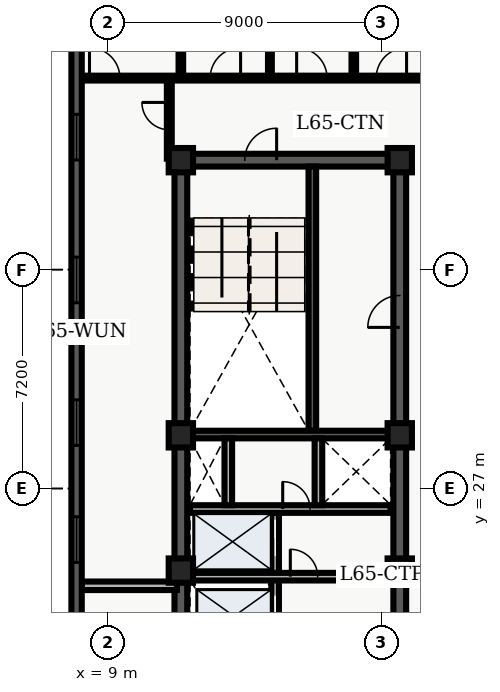
"""IFC4 building model, lengths in metres.
Left out: names, types, materials, properties, quantities, classifications, styles, units other than length and angle.
Written with IfcOpenShell. Run it as: python <this file> out.ifc"""

import sys

from ifc_helpers import new_model, entity, si_unit, converted_unit, direction, frame, origin_with_axes, origin_2d_with_axis, place, context, subcontext, project, spatial, polyline, rectangle, outline, extrude, element, fill, save


model = new_model("IFC4")
c1 = context("Model", 3, precision=1e-05, world=origin_with_axes(), true_north=direction((0.0, 1.0)))
c2 = subcontext(c1, "Body", "Model", "MODEL_VIEW")
j1 = project(units=[si_unit("LENGTHUNIT", "METRE"), converted_unit("PLANEANGLEUNIT", "DEGREE", entity("IfcPlaneAngleMeasure", 0.017), si_unit("PLANEANGLEUNIT", "RADIAN"), dimensions=[0, 0, 0, 0, 0, 0, 0])], contexts=[c1])
p1 = place(None, origin_with_axes())
s1 = spatial("IfcSite", under=j1, at=p1, CompositionType="ELEMENT")
p2 = place(p1, origin_with_axes())
s2 = spatial("IfcBuilding", under=s1, at=p2, CompositionType="ELEMENT")
p3 = place(p2, frame((0.0, 0.0, 264.6), z_axis=(0.0, 0.0, 1.0), x_axis=(1.0, 0.0, 0.0)))
s3 = spatial("IfcBuildingStorey", under=s2, at=p3, CompositionType="ELEMENT", Elevation=264.6)
p4 = place(p3, frame((11.4, 10.8, 0.0), z_axis=(0.0, 0.0, 1.0), x_axis=(0.0, 1.0, 0.0)))
e1 = element("IfcWall", 1, at=p4, inside=s3, PredefinedType="SHEAR", context=c2, shape_type="SweptSolid", body=[
    extrude(outline(polyline([(0.0, -0.21), (27.0, -0.21), (27.0, 0.21), (0.0, 0.21), (0.0, -0.21)])), origin_with_axes(), (0.0, 0.0, 1.0), 3.66),
])
p5 = place(p3, frame((11.4, 37.8, 0.0), z_axis=(0.0, 0.0, 1.0), x_axis=(1.0, 0.0, 0.0)))
e2 = element("IfcWall", 2, at=p5, inside=s3, PredefinedType="SHEAR", context=c2, shape_type="SweptSolid", body=[
    extrude(outline(polyline([(0.0, -0.21), (7.2, -0.21), (7.2, 0.21), (0.0, 0.21), (0.0, -0.21)])), origin_with_axes(), (0.0, 0.0, 1.0), 3.66),
])
p6 = place(p5, frame((2.625, 0.0, 0.0), z_axis=(0.0, 0.0, 1.0), x_axis=(1.0, 0.0, 0.0)))
e3 = element("IfcOpeningElement", 3, at=p6, cuts=e2, PredefinedType="OPENING", context=c2, shape_type="SweptSolid", body=[
    extrude(rectangle(XDim=1.05, YDim=0.44, at=origin_2d_with_axis()), origin_with_axes(), (0.0, 0.0, 1.0), 2.15),
])
p7 = place(p3, frame((18.6, 10.8, 0.0), z_axis=(0.0, 0.0, 1.0), x_axis=(0.0, 1.0, 0.0)))
e4 = element("IfcWall", 4, at=p7, inside=s3, PredefinedType="SHEAR", context=c2, shape_type="SweptSolid", body=[
    extrude(outline(polyline([(0.0, -0.21), (13.5, -0.21), (13.5, 0.21), (0.0, 0.21), (0.0, -0.21)])), origin_with_axes(), (0.0, 0.0, 1.0), 3.66),
])
p8 = place(p7, frame((1.3, 0.0, 0.0), z_axis=(0.0, 0.0, 1.0), x_axis=(1.0, 0.0, 0.0)))
e5 = element("IfcOpeningElement", 5, at=p8, cuts=e4, PredefinedType="OPENING", context=c2, shape_type="SweptSolid", body=[
    extrude(rectangle(XDim=1.1, YDim=0.44, at=origin_2d_with_axis()), origin_with_axes(), (0.0, 0.0, 1.0), 2.15),
])
p9 = place(p7, frame((3.4, 0.0, 0.0), z_axis=(0.0, 0.0, 1.0), x_axis=(1.0, 0.0, 0.0)))
e6 = element("IfcOpeningElement", 6, at=p9, cuts=e4, PredefinedType="OPENING", context=c2, shape_type="SweptSolid", body=[
    extrude(rectangle(XDim=1.1, YDim=0.44, at=origin_2d_with_axis()), origin_with_axes(), (0.0, 0.0, 1.0), 2.15),
])
p10 = place(p7, frame((11.125, 0.0, 0.0), z_axis=(0.0, 0.0, 1.0), x_axis=(1.0, 0.0, 0.0)))
e7 = element("IfcOpeningElement", 7, at=p10, cuts=e4, PredefinedType="OPENING", context=c2, shape_type="SweptSolid", body=[
    extrude(rectangle(XDim=1.05, YDim=0.44, at=origin_2d_with_axis()), origin_with_axes(), (0.0, 0.0, 1.0), 2.15),
])
p11 = place(p7, frame((6.675, 0.0, 0.0), z_axis=(0.0, 0.0, 1.0), x_axis=(1.0, 0.0, 0.0)))
e8 = element("IfcOpeningElement", 8, at=p11, cuts=e4, PredefinedType="OPENING", context=c2, shape_type="SweptSolid", body=[
    extrude(rectangle(XDim=0.95, YDim=0.44, at=origin_2d_with_axis()), origin_with_axes(), (0.0, 0.0, 1.0), 2.15),
])
p12 = place(p3, frame((18.6, 24.3, 0.0), z_axis=(0.0, 0.0, 1.0), x_axis=(0.0, 1.0, 0.0)))
e9 = element("IfcWall", 9, at=p12, inside=s3, PredefinedType="SHEAR", context=c2, shape_type="SweptSolid", body=[
    extrude(outline(polyline([(0.0, -0.21), (13.5, -0.21), (13.5, 0.21), (0.0, 0.21), (0.0, -0.21)])), origin_with_axes(), (0.0, 0.0, 1.0), 3.66),
])
p13 = place(p12, frame((8.525, 0.0, 0.0), z_axis=(0.0, 0.0, 1.0), x_axis=(1.0, 0.0, 0.0)))
e10 = element("IfcOpeningElement", 10, at=p13, cuts=e9, PredefinedType="OPENING", context=c2, shape_type="SweptSolid", body=[
    extrude(rectangle(XDim=1.05, YDim=0.44, at=origin_2d_with_axis()), origin_with_axes(), (0.0, 0.0, 1.0), 2.15),
])
p14 = place(p3, frame((15.725, 28.9, 0.0), z_axis=(0.0, 0.0, 1.0), x_axis=(0.0, 1.0, 0.0)))
e11 = element("IfcWall", 11, at=p14, inside=s3, PredefinedType="SHEAR", context=c2, shape_type="SweptSolid", body=[
    extrude(outline(polyline([(0.0, -0.125), (8.69, -0.125), (8.69, 0.125), (0.0, 0.125), (0.0, -0.125)])), origin_with_axes(), (0.0, 0.0, 1.0), 3.66),
])
p15 = place(p3, frame((11.61, 28.775, 0.0), z_axis=(0.0, 0.0, 1.0), x_axis=(1.0, 0.0, 0.0)))
e12 = element("IfcWall", 12, at=p15, inside=s3, PredefinedType="SHEAR", context=c2, shape_type="SweptSolid", body=[
    extrude(outline(polyline([(0.0, -0.125), (6.78, -0.125), (6.78, 0.125), (0.0, 0.125), (0.0, -0.125)])), origin_with_axes(), (0.0, 0.0, 1.0), 3.66),
])
p16 = place(p3, frame((14.5, 19.95, 0.0), z_axis=(0.0, 0.0, 1.0), x_axis=(0.0, 1.0, 0.0)))
e13 = element("IfcWall", 13, at=p16, inside=s3, PredefinedType="SOLIDWALL", context=c2, shape_type="SweptSolid", body=[
    extrude(outline(polyline([(0.0, -0.125), (6.25, -0.125), (6.25, 0.125), (0.0, 0.125), (0.0, -0.125)])), origin_with_axes(), (0.0, 0.0, 1.0), 2.7),
])
p17 = place(p16, frame((1.025, 0.0, 0.0), z_axis=(0.0, 0.0, 1.0), x_axis=(1.0, 0.0, 0.0)))
e14 = element("IfcOpeningElement", 14, at=p17, cuts=e13, PredefinedType="OPENING", context=c2, shape_type="SweptSolid", body=[
    extrude(rectangle(XDim=1.1, YDim=0.27, at=origin_2d_with_axis()), origin_with_axes(), (0.0, 0.0, 1.0), 2.15),
])
p18 = place(p16, frame((2.975, 0.0, 0.0), z_axis=(0.0, 0.0, 1.0), x_axis=(1.0, 0.0, 0.0)))
e15 = element("IfcOpeningElement", 15, at=p18, cuts=e13, PredefinedType="OPENING", context=c2, shape_type="SweptSolid", body=[
    extrude(rectangle(XDim=1.1, YDim=0.27, at=origin_2d_with_axis()), origin_with_axes(), (0.0, 0.0, 1.0), 2.15),
])
p19 = place(p16, frame((5.425, 0.0, 0.0), z_axis=(0.0, 0.0, 1.0), x_axis=(1.0, 0.0, 0.0)))
e16 = element("IfcOpeningElement", 16, at=p19, cuts=e13, PredefinedType="OPENING", context=c2, shape_type="SweptSolid", body=[
    extrude(rectangle(XDim=1.2, YDim=0.27, at=origin_2d_with_axis()), origin_with_axes(), (0.0, 0.0, 1.0), 2.15),
])
p20 = place(p3, frame((11.7, 24.1, 0.0), z_axis=(0.0, 0.0, 1.0), x_axis=(1.0, 0.0, 0.0)))
e17 = element("IfcWall", 17, at=p20, inside=s3, PredefinedType="SOLIDWALL", context=c2, shape_type="SweptSolid", body=[
    extrude(outline(polyline([(0.0, -0.125), (6.6, -0.125), (6.6, 0.125), (0.0, 0.125), (0.0, -0.125)])), origin_with_axes(), (0.0, 0.0, 1.0), 2.7),
])
p21 = place(p20, frame((3.75, 0.0, 0.0), z_axis=(0.0, 0.0, 1.0), x_axis=(1.0, 0.0, 0.0)))
e18 = element("IfcOpeningElement", 18, at=p21, cuts=e17, PredefinedType="OPENING", context=c2, shape_type="SweptSolid", body=[
    extrude(rectangle(XDim=0.9, YDim=0.27, at=origin_2d_with_axis()), origin_with_axes(), (0.0, 0.0, 1.0), 2.15),
])
p22 = place(p3, frame((11.7, 26.325, 0.0), z_axis=(0.0, 0.0, 1.0), x_axis=(1.0, 0.0, 0.0)))
e19 = element("IfcWall", 19, at=p22, inside=s3, PredefinedType="SOLIDWALL", context=c2, shape_type="SweptSolid", body=[
    extrude(outline(polyline([(0.0, -0.125), (6.6, -0.125), (6.6, 0.125), (0.0, 0.125), (0.0, -0.125)])), origin_with_axes(), (0.0, 0.0, 1.0), 2.7),
])
p23 = place(p22, frame((3.5, 0.0, 0.0), z_axis=(0.0, 0.0, 1.0), x_axis=(1.0, 0.0, 0.0)))
e20 = element("IfcOpeningElement", 20, at=p23, cuts=e19, PredefinedType="OPENING", context=c2, shape_type="SweptSolid", body=[
    extrude(rectangle(XDim=0.9, YDim=0.27, at=origin_2d_with_axis()), origin_with_axes(), (0.0, 0.0, 1.0), 2.15),
])
for number, where, z_axis, x_axis in (
    (21, (12.96, 26.45, 0.0), (0.0, 0.0, 1.0), (0.0, 1.0, 0.0)),
    (22, (15.925, 26.45, 0.0), (0.0, 0.0, 1.0), (0.0, 1.0, 0.0)),
):
    element("IfcWall", number, at=place(p3, frame(where, z_axis=z_axis, x_axis=x_axis)), inside=s3, PredefinedType="SOLIDWALL", context=c2, shape_type="SweptSolid", body=[
        extrude(outline(polyline([(0.0, -0.125), (2.2, -0.125), (2.2, 0.125), (0.0, 0.125), (0.0, -0.125)])), origin_with_axes(), (0.0, 0.0, 1.0), 2.7),
    ])
for number, where, z_axis, x_axis in (
    (23, (11.4, 24.3, 0.0), (0.0, 0.0, 1.0), (1.0, 0.0, 0.0)),
    (24, (11.4, 28.75, 0.0), (0.0, 0.0, 1.0), (1.0, 0.0, 0.0)),
    (25, (11.4, 37.8, 0.0), (0.0, 0.0, 1.0), (1.0, 0.0, 0.0)),
    (26, (18.6, 24.3, 0.0), (0.0, 0.0, 1.0), (1.0, 0.0, 0.0)),
    (27, (18.6, 28.75, 0.0), (0.0, 0.0, 1.0), (1.0, 0.0, 0.0)),
    (28, (18.6, 37.8, 0.0), (0.0, 0.0, 1.0), (1.0, 0.0, 0.0)),
):
    element("IfcColumn", number, at=place(p3, frame(where, z_axis=z_axis, x_axis=x_axis)), inside=s3, PredefinedType="COLUMN", context=c2, shape_type="SweptSolid", body=[
        extrude(rectangle(XDim=0.8, YDim=0.8, at=origin_2d_with_axis()), origin_with_axes(), (0.0, 0.0, 1.0), 3.9),
    ])
p24 = place(p3, frame((8.135, 40.5, 0.0), z_axis=(0.0, 0.0, 1.0), x_axis=(1.0, 0.0, 0.0)))
e29 = element("IfcWall", 29, at=p24, inside=s3, PredefinedType="PARTITIONING", context=c2, shape_type="SweptSolid", body=[
    extrude(outline(polyline([(0.0, -0.08), (23.93, -0.08), (23.93, 0.08), (0.0, 0.08), (0.0, -0.08)])), origin_with_axes(), (0.0, 0.0, 1.0), 2.7),
])
p25 = place(p24, frame((0.76, 0.0, 0.0), z_axis=(0.0, 0.0, 1.0), x_axis=(1.0, 0.0, 0.0)))
e30 = element("IfcOpeningElement", 30, at=p25, cuts=e29, PredefinedType="OPENING", context=c2, shape_type="SweptSolid", body=[
    extrude(rectangle(XDim=1.0, YDim=0.18, at=origin_2d_with_axis()), origin_with_axes(), (0.0, 0.0, 1.0), 2.15),
])
p26 = place(p24, frame((4.729, 0.0, 0.0), z_axis=(0.0, 0.0, 1.0), x_axis=(1.0, 0.0, 0.0)))
e31 = element("IfcOpeningElement", 31, at=p26, cuts=e29, PredefinedType="OPENING", context=c2, shape_type="SweptSolid", body=[
    extrude(rectangle(XDim=1.0, YDim=0.18, at=origin_2d_with_axis()), origin_with_axes(), (0.0, 0.0, 1.0), 2.15),
])
p27 = place(p24, frame((7.574, 0.0, 0.0), z_axis=(0.0, 0.0, 1.0), x_axis=(1.0, 0.0, 0.0)))
e32 = element("IfcOpeningElement", 32, at=p27, cuts=e29, PredefinedType="OPENING", context=c2, shape_type="SweptSolid", body=[
    extrude(rectangle(XDim=1.0, YDim=0.18, at=origin_2d_with_axis()), origin_with_axes(), (0.0, 0.0, 1.0), 2.15),
])
p28 = place(p24, frame((10.189, 0.0, 0.0), z_axis=(0.0, 0.0, 1.0), x_axis=(1.0, 0.0, 0.0)))
e33 = element("IfcOpeningElement", 33, at=p28, cuts=e29, PredefinedType="OPENING", context=c2, shape_type="SweptSolid", body=[
    extrude(rectangle(XDim=1.0, YDim=0.18, at=origin_2d_with_axis()), origin_with_axes(), (0.0, 0.0, 1.0), 2.15),
])
p29 = place(p3, frame((11.02, 37.85, 0.0), z_axis=(0.0, 0.0, 1.0), x_axis=(0.0, 1.0, 0.0)))
e34 = element("IfcWall", 34, at=p29, inside=s3, PredefinedType="PARTITIONING", context=c2, shape_type="SweptSolid", body=[
    extrude(outline(polyline([(0.0, -0.08), (2.65, -0.08), (2.65, 0.08), (0.0, 0.08), (0.0, -0.08)])), origin_with_axes(), (0.0, 0.0, 1.0), 2.7),
])
p30 = place(p29, frame((1.4, 0.0, 0.0), z_axis=(0.0, 0.0, 1.0), x_axis=(1.0, 0.0, 0.0)))
e35 = element("IfcOpeningElement", 35, at=p30, cuts=e34, PredefinedType="OPENING", context=c2, shape_type="SweptSolid", body=[
    extrude(rectangle(XDim=0.9, YDim=0.18, at=origin_2d_with_axis()), origin_with_axes(), (0.0, 0.0, 1.0), 2.15),
])
p31 = place(p3, frame((8.135, 23.8, 0.0), z_axis=(0.0, 0.0, 1.0), x_axis=(1.0, 0.0, 0.0)))
e36 = element("IfcWall", 36, at=p31, inside=s3, PredefinedType="PARTITIONING", context=c2, shape_type="SweptSolid", body=[
    extrude(outline(polyline([(0.0, -0.14), (3.135, -0.14), (3.135, 0.14), (0.0, 0.14), (0.0, -0.14)])), origin_with_axes(), (0.0, 0.0, 1.0), 2.7),
])
p32 = place(p3, frame((11.4, 40.6, 0.0), z_axis=(0.0, 0.0, 1.0), x_axis=(0.0, 1.0, 0.0)))
e37 = element("IfcWall", 37, at=p32, inside=s3, PredefinedType="PARTITIONING", context=c2, shape_type="SweptSolid", body=[
    extrude(outline(polyline([(0.0, -0.075), (5.42, -0.075), (5.42, 0.075), (0.0, 0.075), (0.0, -0.075)])), origin_with_axes(), (0.0, 0.0, 1.0), 2.7),
])
p33 = place(p3, frame((14.329, 40.6, 0.0), z_axis=(0.0, 0.0, 1.0), x_axis=(0.0, 1.0, 0.0)))
e38 = element("IfcWall", 38, at=p33, inside=s3, PredefinedType="PARTITIONING", context=c2, shape_type="SweptSolid", body=[
    extrude(outline(polyline([(0.0, -0.062), (5.42, -0.062), (5.42, 0.062), (0.0, 0.062), (0.0, -0.062)])), origin_with_axes(), (0.0, 0.0, 1.0), 2.7),
])
p34 = place(p3, frame((17.088, 40.6, 0.0), z_axis=(0.0, 0.0, 1.0), x_axis=(0.0, 1.0, 0.0)))
e39 = element("IfcWall", 39, at=p34, inside=s3, PredefinedType="PARTITIONING", context=c2, shape_type="SweptSolid", body=[
    extrude(outline(polyline([(0.0, -0.075), (5.42, -0.075), (5.42, 0.075), (0.0, 0.075), (0.0, -0.075)])), origin_with_axes(), (0.0, 0.0, 1.0), 2.7),
])
p35 = place(p3, frame((7.97, 2.74, 0.0), z_axis=(0.0, 0.0, 1.0), x_axis=(0.0, 1.0, 0.0)))
e40 = element("IfcWall", 40, at=p35, inside=s3, PredefinedType="SOLIDWALL", context=c2, shape_type="SweptSolid", body=[
    extrude(outline(polyline([(0.0, -0.17), (43.46, -0.17), (43.46, 0.17), (0.0, 0.17), (0.0, -0.17)])), origin_with_axes(), (0.0, 0.0, 1.0), 3.66),
])
p36 = place(p35, frame((2.948, 0.0, 0.45), z_axis=(0.0, 0.0, 1.0), x_axis=(1.0, 0.0, 0.0)))
e41 = element("IfcOpeningElement", 41, at=p36, cuts=e40, PredefinedType="OPENING", context=c2, shape_type="SweptSolid", body=[
    extrude(rectangle(XDim=1.5, YDim=0.36, at=origin_2d_with_axis()), origin_with_axes(), (0.0, 0.0, 1.0), 2.1),
])
p37 = place(p35, frame((7.643, 0.0, 0.45), z_axis=(0.0, 0.0, 1.0), x_axis=(1.0, 0.0, 0.0)))
e42 = element("IfcOpeningElement", 42, at=p37, cuts=e40, PredefinedType="OPENING", context=c2, shape_type="SweptSolid", body=[
    extrude(rectangle(XDim=1.5, YDim=0.36, at=origin_2d_with_axis()), origin_with_axes(), (0.0, 0.0, 1.0), 2.1),
])
p38 = place(p35, frame((12.339, 0.0, 0.45), z_axis=(0.0, 0.0, 1.0), x_axis=(1.0, 0.0, 0.0)))
e43 = element("IfcOpeningElement", 43, at=p38, cuts=e40, PredefinedType="OPENING", context=c2, shape_type="SweptSolid", body=[
    extrude(rectangle(XDim=1.5, YDim=0.36, at=origin_2d_with_axis()), origin_with_axes(), (0.0, 0.0, 1.0), 2.1),
])
p39 = place(p35, frame((17.034, 0.0, 0.45), z_axis=(0.0, 0.0, 1.0), x_axis=(1.0, 0.0, 0.0)))
e44 = element("IfcOpeningElement", 44, at=p39, cuts=e40, PredefinedType="OPENING", context=c2, shape_type="SweptSolid", body=[
    extrude(rectangle(XDim=1.5, YDim=0.36, at=origin_2d_with_axis()), origin_with_axes(), (0.0, 0.0, 1.0), 2.1),
])
p40 = place(p35, frame((22.58, 0.0, 0.45), z_axis=(0.0, 0.0, 1.0), x_axis=(1.0, 0.0, 0.0)))
e45 = element("IfcOpeningElement", 45, at=p40, cuts=e40, PredefinedType="OPENING", context=c2, shape_type="SweptSolid", body=[
    extrude(rectangle(XDim=1.5, YDim=0.36, at=origin_2d_with_axis()), origin_with_axes(), (0.0, 0.0, 1.0), 2.1),
])
p41 = place(p35, frame((26.426, 0.0, 0.45), z_axis=(0.0, 0.0, 1.0), x_axis=(1.0, 0.0, 0.0)))
e46 = element("IfcOpeningElement", 46, at=p41, cuts=e40, PredefinedType="OPENING", context=c2, shape_type="SweptSolid", body=[
    extrude(rectangle(XDim=1.5, YDim=0.36, at=origin_2d_with_axis()), origin_with_axes(), (0.0, 0.0, 1.0), 2.1),
])
p42 = place(p35, frame((31.121, 0.0, 0.45), z_axis=(0.0, 0.0, 1.0), x_axis=(1.0, 0.0, 0.0)))
e47 = element("IfcOpeningElement", 47, at=p42, cuts=e40, PredefinedType="OPENING", context=c2, shape_type="SweptSolid", body=[
    extrude(rectangle(XDim=1.5, YDim=0.36, at=origin_2d_with_axis()), origin_with_axes(), (0.0, 0.0, 1.0), 2.1),
])
p43 = place(p35, frame((35.817, 0.0, 0.45), z_axis=(0.0, 0.0, 1.0), x_axis=(1.0, 0.0, 0.0)))
e48 = element("IfcOpeningElement", 48, at=p43, cuts=e40, PredefinedType="OPENING", context=c2, shape_type="SweptSolid", body=[
    extrude(rectangle(XDim=1.5, YDim=0.36, at=origin_2d_with_axis()), origin_with_axes(), (0.0, 0.0, 1.0), 2.1),
])
p44 = place(p35, frame((40.512, 0.0, 0.45), z_axis=(0.0, 0.0, 1.0), x_axis=(1.0, 0.0, 0.0)))
e49 = element("IfcOpeningElement", 49, at=p44, cuts=e40, PredefinedType="OPENING", context=c2, shape_type="SweptSolid", body=[
    extrude(rectangle(XDim=1.5, YDim=0.36, at=origin_2d_with_axis()), origin_with_axes(), (0.0, 0.0, 1.0), 2.1),
])
p45 = place(p16, frame((2.975, 0.0, 0.0), z_axis=(0.0, 0.0, 1.0), x_axis=(1.0, 0.0, 0.0)))
e50 = element("IfcDoor", 50, at=p45, inside=s3, OperationType="SLIDING_TO_RIGHT", PredefinedType="DOOR", context=c2, shape_type="SweptSolid", body=[
    extrude(rectangle(XDim=1.1, YDim=0.09, at=origin_2d_with_axis()), origin_with_axes(), (0.0, 0.0, 1.0), 2.15),
])
fill(e15, e50)
p46 = place(p16, frame((5.425, 0.0, 0.0), z_axis=(0.0, 0.0, 1.0), x_axis=(1.0, 0.0, 0.0)))
e51 = element("IfcDoor", 51, at=p46, inside=s3, OperationType="DOUBLE_DOOR_SLIDING", PredefinedType="DOOR", context=c2, shape_type="SweptSolid", body=[
    extrude(rectangle(XDim=1.2, YDim=0.09, at=origin_2d_with_axis()), origin_with_axes(), (0.0, 0.0, 1.0), 2.15),
])
fill(e16, e51)
p47 = place(p5, frame((2.625, 0.0, 0.0), z_axis=(0.0, 0.0, 1.0), x_axis=(1.0, 0.0, 0.0)))
e52 = element("IfcDoor", 52, at=p47, inside=s3, OperationType="SINGLE_SWING_RIGHT", PredefinedType="DOOR", context=c2, shape_type="SweptSolid", body=[
    extrude(rectangle(XDim=1.05, YDim=0.09, at=origin_2d_with_axis()), origin_with_axes(), (0.0, 0.0, 1.0), 2.15),
])
fill(e3, e52)
p48 = place(p20, frame((3.75, 0.0, 0.0), z_axis=(0.0, 0.0, 1.0), x_axis=(1.0, 0.0, 0.0)))
e53 = element("IfcDoor", 53, at=p48, inside=s3, OperationType="SINGLE_SWING_LEFT", PredefinedType="DOOR", context=c2, shape_type="SweptSolid", body=[
    extrude(rectangle(XDim=0.9, YDim=0.09, at=origin_2d_with_axis()), origin_with_axes(), (0.0, 0.0, 1.0), 2.15),
])
fill(e18, e53)
p49 = place(p22, frame((3.5, 0.0, 0.0), z_axis=(0.0, 0.0, 1.0), x_axis=(1.0, 0.0, 0.0)))
e54 = element("IfcDoor", 54, at=p49, inside=s3, OperationType="SINGLE_SWING_LEFT", PredefinedType="DOOR", context=c2, shape_type="SweptSolid", body=[
    extrude(rectangle(XDim=0.9, YDim=0.09, at=origin_2d_with_axis()), origin_with_axes(), (0.0, 0.0, 1.0), 2.15),
])
fill(e20, e54)
p50 = place(p12, frame((8.525, 0.0, 0.0), z_axis=(0.0, 0.0, 1.0), x_axis=(1.0, 0.0, 0.0)))
e55 = element("IfcDoor", 55, at=p50, inside=s3, OperationType="SINGLE_SWING_LEFT", PredefinedType="DOOR", context=c2, shape_type="SweptSolid", body=[
    extrude(rectangle(XDim=1.05, YDim=0.09, at=origin_2d_with_axis()), origin_with_axes(), (0.0, 0.0, 1.0), 2.15),
])
fill(e10, e55)
p51 = place(p29, frame((1.4, 0.0, 0.0), z_axis=(0.0, 0.0, 1.0), x_axis=(1.0, 0.0, 0.0)))
e56 = element("IfcDoor", 56, at=p51, inside=s3, OperationType="SINGLE_SWING_RIGHT", PredefinedType="DOOR", context=c2, shape_type="SweptSolid", body=[
    extrude(rectangle(XDim=0.9, YDim=0.09, at=origin_2d_with_axis()), origin_with_axes(), (0.0, 0.0, 1.0), 2.15),
])
fill(e35, e56)
p52 = place(p24, frame((0.76, 0.0, 0.0), z_axis=(0.0, 0.0, 1.0), x_axis=(1.0, 0.0, 0.0)))
e57 = element("IfcDoor", 57, at=p52, inside=s3, OperationType="SINGLE_SWING_LEFT", PredefinedType="DOOR", context=c2, shape_type="SweptSolid", body=[
    extrude(rectangle(XDim=1.0, YDim=0.09, at=origin_2d_with_axis()), origin_with_axes(), (0.0, 0.0, 1.0), 2.15),
])
fill(e30, e57)
p53 = place(p24, frame((4.729, 0.0, 0.0), z_axis=(0.0, 0.0, 1.0), x_axis=(1.0, 0.0, 0.0)))
e58 = element("IfcDoor", 58, at=p53, inside=s3, OperationType="SINGLE_SWING_RIGHT", PredefinedType="DOOR", context=c2, shape_type="SweptSolid", body=[
    extrude(rectangle(XDim=1.0, YDim=0.09, at=origin_2d_with_axis()), origin_with_axes(), (0.0, 0.0, 1.0), 2.15),
])
fill(e31, e58)
p54 = place(p24, frame((7.574, 0.0, 0.0), z_axis=(0.0, 0.0, 1.0), x_axis=(1.0, 0.0, 0.0)))
e59 = element("IfcDoor", 59, at=p54, inside=s3, OperationType="SINGLE_SWING_LEFT", PredefinedType="DOOR", context=c2, shape_type="SweptSolid", body=[
    extrude(rectangle(XDim=1.0, YDim=0.09, at=origin_2d_with_axis()), origin_with_axes(), (0.0, 0.0, 1.0), 2.15),
])
fill(e32, e59)
p55 = place(p24, frame((10.189, 0.0, 0.0), z_axis=(0.0, 0.0, 1.0), x_axis=(1.0, 0.0, 0.0)))
e60 = element("IfcDoor", 60, at=p55, inside=s3, OperationType="SINGLE_SWING_RIGHT", PredefinedType="DOOR", context=c2, shape_type="SweptSolid", body=[
    extrude(rectangle(XDim=1.0, YDim=0.09, at=origin_2d_with_axis()), origin_with_axes(), (0.0, 0.0, 1.0), 2.15),
])
fill(e33, e60)
p56 = place(p35, frame((22.58, 0.0, 0.45), z_axis=(0.0, 0.0, 1.0), x_axis=(1.0, 0.0, 0.0)))
e61 = element("IfcWindow", 61, at=p56, inside=s3, PredefinedType="WINDOW", context=c2, shape_type="SweptSolid", body=[
    extrude(rectangle(XDim=1.5, YDim=0.09, at=origin_2d_with_axis()), origin_with_axes(), (0.0, 0.0, 1.0), 2.1),
])
fill(e45, e61)
p57 = place(p35, frame((26.426, 0.0, 0.45), z_axis=(0.0, 0.0, 1.0), x_axis=(1.0, 0.0, 0.0)))
e62 = element("IfcWindow", 62, at=p57, inside=s3, PredefinedType="WINDOW", context=c2, shape_type="SweptSolid", body=[
    extrude(rectangle(XDim=1.5, YDim=0.09, at=origin_2d_with_axis()), origin_with_axes(), (0.0, 0.0, 1.0), 2.1),
])
fill(e46, e62)
p58 = place(p35, frame((31.121, 0.0, 0.45), z_axis=(0.0, 0.0, 1.0), x_axis=(1.0, 0.0, 0.0)))
e63 = element("IfcWindow", 63, at=p58, inside=s3, PredefinedType="WINDOW", context=c2, shape_type="SweptSolid", body=[
    extrude(rectangle(XDim=1.5, YDim=0.09, at=origin_2d_with_axis()), origin_with_axes(), (0.0, 0.0, 1.0), 2.1),
])
fill(e47, e63)
p59 = place(p35, frame((35.817, 0.0, 0.45), z_axis=(0.0, 0.0, 1.0), x_axis=(1.0, 0.0, 0.0)))
e64 = element("IfcWindow", 64, at=p59, inside=s3, PredefinedType="WINDOW", context=c2, shape_type="SweptSolid", body=[
    extrude(rectangle(XDim=1.5, YDim=0.09, at=origin_2d_with_axis()), origin_with_axes(), (0.0, 0.0, 1.0), 2.1),
])
fill(e48, e64)
save(model, sys.argv[1])
